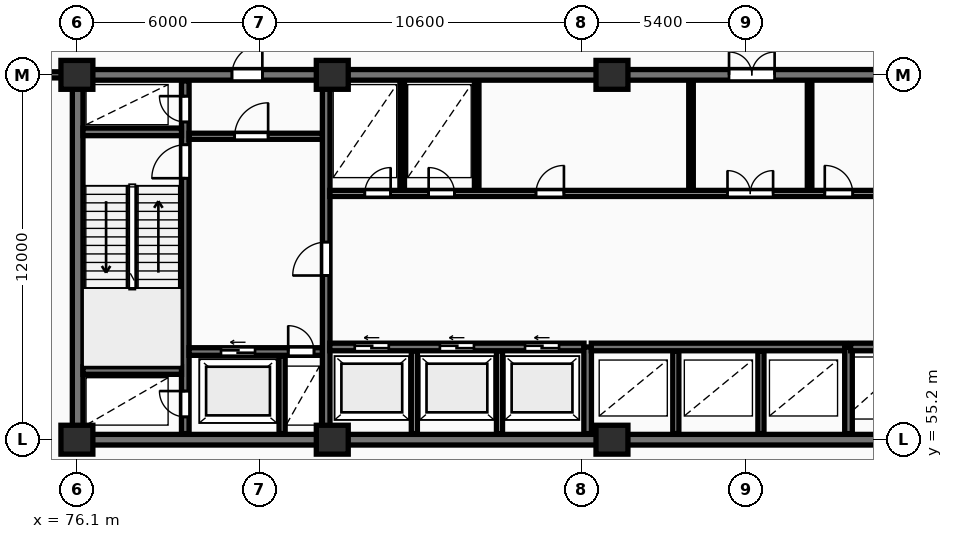
"""IFC4 building model, lengths in metres.
Left out: names, types, materials, properties, quantities, classifications, styles, units other than length and angle.
Written with IfcOpenShell. Run it as: python <this file> out.ifc"""

import sys

from ifc_helpers import new_model, si_unit, direction, frame, frame_2d, origin, origin_2d, place, context, subcontext, project, spatial, rectangle, extrude, element, fill, save


model = new_model("IFC4")
c1 = context("Model", 3, precision=1e-05, world=origin(), true_north=direction((0.0, 1.0)))
c2 = subcontext(c1, "Body", "Model", "MODEL_VIEW")
j1 = project(units=[si_unit("LENGTHUNIT", "METRE"), si_unit("PLANEANGLEUNIT", "RADIAN")], contexts=[c1])
p1 = place(None, origin())
s1 = spatial("IfcSite", under=j1, at=p1, CompositionType="ELEMENT")
p2 = place(p1, origin())
s2 = spatial("IfcBuilding", under=s1, at=p2, CompositionType="ELEMENT")
p3 = place(p2, frame((0.0, 0.0, 76.0)))
s3 = spatial("IfcBuildingStorey", under=s2, at=p3, CompositionType="ELEMENT", Elevation=76.0)
for number, where, z_axis, x_axis in (
    (1, (76.1, 55.2, 0.0), (0.0, 0.0, 1.0), (1.0, 0.0, 0.0)),
    (2, (76.1, 67.2, 0.0), (0.0, 0.0, 1.0), (1.0, 0.0, 0.0)),
    (3, (84.5, 55.2, 0.0), (0.0, 0.0, 1.0), (1.0, 0.0, 0.0)),
    (4, (84.5, 67.2, 0.0), (0.0, 0.0, 1.0), (1.0, 0.0, 0.0)),
    (5, (93.7, 55.2, 0.0), (0.0, 0.0, 1.0), (1.0, 0.0, 0.0)),
    (6, (93.7, 67.2, 0.0), (0.0, 0.0, 1.0), (1.0, 0.0, 0.0)),
):
    element("IfcColumn", number, at=place(p3, frame(where, z_axis=z_axis, x_axis=x_axis)), inside=s3, PredefinedType="COLUMN", context=c2, shape_type="SweptSolid", body=[
        extrude(rectangle(XDim=1.05, YDim=0.95, at=origin_2d()), origin(), (0.0, 0.0, 1.0), 4.8),
    ])
p4 = place(p3, frame((75.95, 55.2, 0.0), z_axis=(0.0, 0.0, 1.0), x_axis=(1.0, 0.0, 0.0)))
e7 = element("IfcWall", 7, at=p4, inside=s3, PredefinedType="SHEAR", context=c2, shape_type="SweptSolid", body=[
    extrude(rectangle(XDim=36.3, YDim=0.35, at=frame_2d((18.15, 0.0))), origin(), (0.0, 0.0, 1.0), 4.8),
])
p5 = place(p3, frame((76.125, 55.375, 0.0), z_axis=(0.0, 0.0, 1.0), x_axis=(0.0, 1.0, 0.0)))
e8 = element("IfcWall", 8, at=p5, inside=s3, PredefinedType="SHEAR", context=c2, shape_type="SweptSolid", body=[
    extrude(rectangle(XDim=11.65, YDim=0.35, at=frame_2d((5.825, 0.0))), origin(), (0.0, 0.0, 1.0), 4.8),
])
p6 = place(p3, frame((75.95, 67.2, 0.0), z_axis=(0.0, 0.0, 1.0), x_axis=(1.0, 0.0, 0.0)))
e9 = element("IfcWall", 9, at=p6, inside=s3, PredefinedType="SHEAR", context=c2, shape_type="SweptSolid", body=[
    extrude(rectangle(XDim=36.3, YDim=0.35, at=frame_2d((18.15, 0.0))), origin(), (0.0, 0.0, 1.0), 4.8),
])
p7 = place(p6, frame((5.25, 0.0, 0.0)))
e10 = element("IfcOpeningElement", 10, at=p7, cuts=e9, PredefinedType="OPENING", context=c2, shape_type="SweptSolid", body=[
    extrude(rectangle(XDim=1.0, YDim=2.15, at=frame_2d((0.5, 1.075))), frame((0.0, 0.185, 0.0), z_axis=(0.0, -1.0, 0.0), x_axis=(1.0, 0.0, 0.0)), (0.0, 0.0, 1.0), 0.37),
])
p8 = place(p6, frame((21.6, 0.0, 0.0)))
e11 = element("IfcOpeningElement", 11, at=p8, cuts=e9, PredefinedType="OPENING", context=c2, shape_type="SweptSolid", body=[
    extrude(rectangle(XDim=1.5, YDim=2.2, at=frame_2d((0.75, 1.1))), frame((0.0, 0.185, 0.0), z_axis=(0.0, -1.0, 0.0), x_axis=(1.0, 0.0, 0.0)), (0.0, 0.0, 1.0), 0.37),
])
p9 = place(p6, frame((30.45, 0.0, 0.0)))
e12 = element("IfcOpeningElement", 12, at=p9, cuts=e9, PredefinedType="OPENING", context=c2, shape_type="SweptSolid", body=[
    extrude(rectangle(XDim=1.0, YDim=2.15, at=frame_2d((0.5, 1.075))), frame((0.0, 0.185, 0.0), z_axis=(0.0, -1.0, 0.0), x_axis=(1.0, 0.0, 0.0)), (0.0, 0.0, 1.0), 0.37),
])
p10 = place(p3, frame((79.665, 55.4, 0.0), z_axis=(0.0, 0.0, 1.0), x_axis=(0.0, 1.0, 0.0)))
e13 = element("IfcWall", 13, at=p10, inside=s3, PredefinedType="SHEAR", context=c2, shape_type="SweptSolid", body=[
    extrude(rectangle(XDim=11.6, YDim=0.25, at=frame_2d((5.8, 0.0))), origin(), (0.0, 0.0, 1.0), 4.8),
])
p11 = place(p10, frame((0.55, 0.0, 0.0)))
e14 = element("IfcOpeningElement", 14, at=p11, cuts=e13, PredefinedType="OPENING", context=c2, shape_type="SweptSolid", body=[
    extrude(rectangle(XDim=0.85, YDim=2.05, at=frame_2d((0.425, 1.025))), frame((0.0, 0.135, 0.0), z_axis=(0.0, -1.0, 0.0), x_axis=(1.0, 0.0, 0.0)), (0.0, 0.0, 1.0), 0.27),
])
p12 = place(p10, frame((8.4, 0.0, 0.0)))
e15 = element("IfcOpeningElement", 15, at=p12, cuts=e13, PredefinedType="OPENING", context=c2, shape_type="SweptSolid", body=[
    extrude(rectangle(XDim=1.1, YDim=2.1, at=frame_2d((0.55, 1.05))), frame((0.0, 0.135, 0.0), z_axis=(0.0, -1.0, 0.0), x_axis=(1.0, 0.0, 0.0)), (0.0, 0.0, 1.0), 0.27),
])
p13 = place(p10, frame((10.25, 0.0, 0.0)))
e16 = element("IfcOpeningElement", 16, at=p13, cuts=e13, PredefinedType="OPENING", context=c2, shape_type="SweptSolid", body=[
    extrude(rectangle(XDim=0.85, YDim=2.05, at=frame_2d((0.425, 1.025))), frame((0.0, 0.135, 0.0), z_axis=(0.0, -1.0, 0.0), x_axis=(1.0, 0.0, 0.0)), (0.0, 0.0, 1.0), 0.27),
])
for number, where, z_axis, x_axis in (
    (17, (76.3, 57.475, 0.0), (0.0, 0.0, 1.0), (1.0, 0.0, 0.0)),
    (18, (76.3, 65.325, 0.0), (0.0, 0.0, 1.0), (1.0, 0.0, 0.0)),
):
    element("IfcWall", number, at=place(p3, frame(where, z_axis=z_axis, x_axis=x_axis)), inside=s3, PredefinedType="SHEAR", context=c2, shape_type="SweptSolid", body=[
        extrude(rectangle(XDim=3.24, YDim=0.25, at=frame_2d((1.62, 0.0))), origin(), (0.0, 0.0, 1.0), 4.8),
    ])
p14 = place(p3, frame((79.79, 58.1, 0.0), z_axis=(0.0, 0.0, 1.0), x_axis=(1.0, 0.0, 0.0)))
e19 = element("IfcWall", 19, at=p14, inside=s3, PredefinedType="SHEAR", context=c2, shape_type="SweptSolid", body=[
    extrude(rectangle(XDim=4.39, YDim=0.25, at=frame_2d((2.195, 0.0))), origin(), (0.0, 0.0, 1.0), 4.8),
])
p15 = place(p14, frame((1.05, 0.0, 0.0)))
e20 = element("IfcOpeningElement", 20, at=p15, cuts=e19, PredefinedType="OPENING", context=c2, shape_type="SweptSolid", body=[
    extrude(rectangle(XDim=1.12, YDim=2.12, at=frame_2d((0.56, 1.06))), frame((0.0, 0.135, 0.0), z_axis=(0.0, -1.0, 0.0), x_axis=(1.0, 0.0, 0.0)), (0.0, 0.0, 1.0), 0.27),
])
p16 = place(p14, frame((3.26, 0.0, 0.0)))
e21 = element("IfcOpeningElement", 21, at=p16, cuts=e19, PredefinedType="OPENING", context=c2, shape_type="SweptSolid", body=[
    extrude(rectangle(XDim=0.85, YDim=2.05, at=frame_2d((0.425, 1.025))), frame((0.0, 0.135, 0.0), z_axis=(0.0, -1.0, 0.0), x_axis=(1.0, 0.0, 0.0)), (0.0, 0.0, 1.0), 0.27),
])
p17 = place(p3, frame((82.85, 55.4, 0.0), z_axis=(0.0, 0.0, 1.0), x_axis=(0.0, 1.0, 0.0)))
e22 = element("IfcWall", 22, at=p17, inside=s3, PredefinedType="PARTITIONING", context=c2, shape_type="SweptSolid", body=[
    extrude(rectangle(XDim=2.56, YDim=0.2, at=frame_2d((1.28, 0.0))), origin(), (0.0, 0.0, 1.0), 4.48),
])
p18 = place(p3, frame((79.79, 65.18, 0.0), z_axis=(0.0, 0.0, 1.0), x_axis=(1.0, 0.0, 0.0)))
e23 = element("IfcWall", 23, at=p18, inside=s3, PredefinedType="PARTITIONING", context=c2, shape_type="SweptSolid", body=[
    extrude(rectangle(XDim=4.39, YDim=0.2, at=frame_2d((2.195, 0.0))), origin(), (0.0, 0.0, 1.0), 4.48),
])
p19 = place(p18, frame((1.5, 0.0, 0.0)))
e24 = element("IfcOpeningElement", 24, at=p19, cuts=e23, PredefinedType="OPENING", context=c2, shape_type="SweptSolid", body=[
    extrude(rectangle(XDim=1.1, YDim=2.1, at=frame_2d((0.55, 1.05))), frame((0.0, 0.11, 0.0), z_axis=(0.0, -1.0, 0.0), x_axis=(1.0, 0.0, 0.0)), (0.0, 0.0, 1.0), 0.22),
])
p20 = place(p3, frame((84.3, 55.4, 0.0), z_axis=(0.0, 0.0, 1.0), x_axis=(0.0, 1.0, 0.0)))
e25 = element("IfcWall", 25, at=p20, inside=s3, PredefinedType="SHEAR", context=c2, shape_type="SweptSolid", body=[
    extrude(rectangle(XDim=11.6, YDim=0.25, at=frame_2d((5.8, 0.0))), origin(), (0.0, 0.0, 1.0), 4.8),
])
p21 = place(p20, frame((5.2, 0.0, 0.0)))
e26 = element("IfcOpeningElement", 26, at=p21, cuts=e25, PredefinedType="OPENING", context=c2, shape_type="SweptSolid", body=[
    extrude(rectangle(XDim=1.1, YDim=2.1, at=frame_2d((0.55, 1.05))), frame((0.0, 0.135, 0.0), z_axis=(0.0, -1.0, 0.0), x_axis=(1.0, 0.0, 0.0)), (0.0, 0.0, 1.0), 0.27),
])
for number, where, z_axis, x_axis in (
    (27, (87.2, 55.4, 0.0), (0.0, 0.0, 1.0), (0.0, 1.0, 0.0)),
    (28, (90.0, 55.4, 0.0), (0.0, 0.0, 1.0), (0.0, 1.0, 0.0)),
):
    element("IfcWall", number, at=place(p3, frame(where, z_axis=z_axis, x_axis=x_axis)), inside=s3, PredefinedType="PARTITIONING", context=c2, shape_type="SweptSolid", body=[
        extrude(rectangle(XDim=2.72, YDim=0.2, at=frame_2d((1.36, 0.0))), origin(), (0.0, 0.0, 1.0), 4.48),
    ])
p22 = place(p3, frame((84.42, 58.25, 0.0), z_axis=(0.0, 0.0, 1.0), x_axis=(1.0, 0.0, 0.0)))
e29 = element("IfcWall", 29, at=p22, inside=s3, PredefinedType="SHEAR", context=c2, shape_type="SweptSolid", body=[
    extrude(rectangle(XDim=8.36, YDim=0.25, at=frame_2d((4.18, 0.0))), origin(), (0.0, 0.0, 1.0), 4.8),
])
p23 = place(p22, frame((0.82, 0.0, 0.0)))
e30 = element("IfcOpeningElement", 30, at=p23, cuts=e29, PredefinedType="OPENING", context=c2, shape_type="SweptSolid", body=[
    extrude(rectangle(XDim=1.12, YDim=2.12, at=frame_2d((0.56, 1.06))), frame((0.0, 0.135, 0.0), z_axis=(0.0, -1.0, 0.0), x_axis=(1.0, 0.0, 0.0)), (0.0, 0.0, 1.0), 0.27),
])
p24 = place(p22, frame((3.62, 0.0, 0.0)))
e31 = element("IfcOpeningElement", 31, at=p24, cuts=e29, PredefinedType="OPENING", context=c2, shape_type="SweptSolid", body=[
    extrude(rectangle(XDim=1.12, YDim=2.12, at=frame_2d((0.56, 1.06))), frame((0.0, 0.135, 0.0), z_axis=(0.0, -1.0, 0.0), x_axis=(1.0, 0.0, 0.0)), (0.0, 0.0, 1.0), 0.27),
])
p25 = place(p22, frame((6.42, 0.0, 0.0)))
e32 = element("IfcOpeningElement", 32, at=p25, cuts=e29, PredefinedType="OPENING", context=c2, shape_type="SweptSolid", body=[
    extrude(rectangle(XDim=1.12, YDim=2.12, at=frame_2d((0.56, 1.06))), frame((0.0, 0.135, 0.0), z_axis=(0.0, -1.0, 0.0), x_axis=(1.0, 0.0, 0.0)), (0.0, 0.0, 1.0), 0.27),
])
p26 = place(p3, frame((92.9, 55.4, 0.0), z_axis=(0.0, 0.0, 1.0), x_axis=(0.0, 1.0, 0.0)))
e33 = element("IfcWall", 33, at=p26, inside=s3, PredefinedType="SHEAR", context=c2, shape_type="SweptSolid", body=[
    extrude(rectangle(XDim=2.85, YDim=0.25, at=frame_2d((1.425, 0.0))), origin(), (0.0, 0.0, 1.0), 4.8),
])
for number, where, z_axis, x_axis in (
    (34, (95.8, 55.4, 0.0), (0.0, 0.0, 1.0), (0.0, 1.0, 0.0)),
    (35, (98.6, 55.4, 0.0), (0.0, 0.0, 1.0), (0.0, 1.0, 0.0)),
):
    element("IfcWall", number, at=place(p3, frame(where, z_axis=z_axis, x_axis=x_axis)), inside=s3, PredefinedType="PARTITIONING", context=c2, shape_type="SweptSolid", body=[
        extrude(rectangle(XDim=2.72, YDim=0.2, at=frame_2d((1.36, 0.0))), origin(), (0.0, 0.0, 1.0), 4.48),
    ])
p27 = place(p3, frame((93.02, 58.25, 0.0), z_axis=(0.0, 0.0, 1.0), x_axis=(1.0, 0.0, 0.0)))
e36 = element("IfcWall", 36, at=p27, inside=s3, PredefinedType="SHEAR", context=c2, shape_type="SweptSolid", body=[
    extrude(rectangle(XDim=8.36, YDim=0.25, at=frame_2d((4.18, 0.0))), origin(), (0.0, 0.0, 1.0), 4.8),
])
p28 = place(p3, frame((101.48, 55.4, 0.0), z_axis=(0.0, 0.0, 1.0), x_axis=(0.0, 1.0, 0.0)))
e37 = element("IfcWall", 37, at=p28, inside=s3, PredefinedType="SHEAR", context=c2, shape_type="SweptSolid", body=[
    extrude(rectangle(XDim=2.85, YDim=0.25, at=frame_2d((1.425, 0.0))), origin(), (0.0, 0.0, 1.0), 4.8),
])
p29 = place(p3, frame((101.55, 58.25, 0.0), z_axis=(0.0, 0.0, 1.0), x_axis=(1.0, 0.0, 0.0)))
e38 = element("IfcWall", 38, at=p29, inside=s3, PredefinedType="SHEAR", context=c2, shape_type="SweptSolid", body=[
    extrude(rectangle(XDim=4.6, YDim=0.25, at=frame_2d((2.3, 0.0))), origin(), (0.0, 0.0, 1.0), 4.8),
])
for number, where, z_axis, x_axis in (
    (39, (86.8, 63.4, 0.0), (0.0, 0.0, 1.0), (0.0, 1.0, 0.0)),
    (40, (89.25, 63.4, 0.0), (0.0, 0.0, 1.0), (0.0, 1.0, 0.0)),
    (41, (96.3, 63.4, 0.0), (0.0, 0.0, 1.0), (0.0, 1.0, 0.0)),
    (42, (100.2, 63.4, 0.0), (0.0, 0.0, 1.0), (0.0, 1.0, 0.0)),
):
    element("IfcWall", number, at=place(p3, frame(where, z_axis=z_axis, x_axis=x_axis)), inside=s3, PredefinedType="PARTITIONING", context=c2, shape_type="SweptSolid", body=[
        extrude(rectangle(XDim=3.6, YDim=0.15, at=frame_2d((1.8, 0.0))), origin(), (0.0, 0.0, 1.0), 4.48),
    ])
p30 = place(p3, frame((84.42, 63.3, 0.0), z_axis=(0.0, 0.0, 1.0), x_axis=(1.0, 0.0, 0.0)))
e43 = element("IfcWall", 43, at=p30, inside=s3, PredefinedType="PARTITIONING", context=c2, shape_type="SweptSolid", body=[
    extrude(rectangle(XDim=19.83, YDim=0.2, at=frame_2d((9.915, 0.0))), origin(), (0.0, 0.0, 1.0), 4.48),
])
p31 = place(p30, frame((1.15, 0.0, 0.0)))
e44 = element("IfcOpeningElement", 44, at=p31, cuts=e43, PredefinedType="OPENING", context=c2, shape_type="SweptSolid", body=[
    extrude(rectangle(XDim=0.85, YDim=2.05, at=frame_2d((0.425, 1.025))), frame((0.0, 0.11, 0.0), z_axis=(0.0, -1.0, 0.0), x_axis=(1.0, 0.0, 0.0)), (0.0, 0.0, 1.0), 0.22),
])
p32 = place(p30, frame((3.25, 0.0, 0.0)))
e45 = element("IfcOpeningElement", 45, at=p32, cuts=e43, PredefinedType="OPENING", context=c2, shape_type="SweptSolid", body=[
    extrude(rectangle(XDim=0.85, YDim=2.05, at=frame_2d((0.425, 1.025))), frame((0.0, 0.11, 0.0), z_axis=(0.0, -1.0, 0.0), x_axis=(1.0, 0.0, 0.0)), (0.0, 0.0, 1.0), 0.22),
])
p33 = place(p30, frame((13.08, 0.0, 0.0)))
e46 = element("IfcOpeningElement", 46, at=p33, cuts=e43, PredefinedType="OPENING", context=c2, shape_type="SweptSolid", body=[
    extrude(rectangle(XDim=1.5, YDim=2.2, at=frame_2d((0.75, 1.1))), frame((0.0, 0.11, 0.0), z_axis=(0.0, -1.0, 0.0), x_axis=(1.0, 0.0, 0.0)), (0.0, 0.0, 1.0), 0.22),
])
p34 = place(p30, frame((6.78, 0.0, 0.0)))
e47 = element("IfcOpeningElement", 47, at=p34, cuts=e43, PredefinedType="OPENING", context=c2, shape_type="SweptSolid", body=[
    extrude(rectangle(XDim=0.92, YDim=2.08, at=frame_2d((0.46, 1.04))), frame((0.0, 0.11, 0.0), z_axis=(0.0, -1.0, 0.0), x_axis=(1.0, 0.0, 0.0)), (0.0, 0.0, 1.0), 0.22),
])
p35 = place(p30, frame((16.28, 0.0, 0.0)))
e48 = element("IfcOpeningElement", 48, at=p35, cuts=e43, PredefinedType="OPENING", context=c2, shape_type="SweptSolid", body=[
    extrude(rectangle(XDim=0.92, YDim=2.08, at=frame_2d((0.46, 1.04))), frame((0.0, 0.11, 0.0), z_axis=(0.0, -1.0, 0.0), x_axis=(1.0, 0.0, 0.0)), (0.0, 0.0, 1.0), 0.22),
])
p36 = place(p3, frame((55.35, 67.2, 0.0), z_axis=(0.0, 0.0, 1.0), x_axis=(1.0, 0.0, 0.0)))
e49 = element("IfcWall", 49, at=p36, inside=s3, PredefinedType="PARTITIONING", context=c2, shape_type="SweptSolid", body=[
    extrude(rectangle(XDim=20.6, YDim=0.2, at=frame_2d((10.3, 0.0))), origin(), (0.0, 0.0, 1.0), 3.23),
])
p37 = place(p36, frame((8.8, 0.0, 0.0)))
e50 = element("IfcOpeningElement", 50, at=p37, cuts=e49, PredefinedType="OPENING", context=c2, shape_type="SweptSolid", body=[
    extrude(rectangle(XDim=1.1, YDim=2.1, at=frame_2d((0.55, 1.05))), frame((0.0, 0.11, 0.0), z_axis=(0.0, -1.0, 0.0), x_axis=(1.0, 0.0, 0.0)), (0.0, 0.0, 1.0), 0.22),
])
p38 = place(p36, frame((14.495, 0.0, 0.0)))
e51 = element("IfcOpeningElement", 51, at=p38, cuts=e49, PredefinedType="OPENING", context=c2, shape_type="SweptSolid", body=[
    extrude(rectangle(XDim=1.1, YDim=2.1, at=frame_2d((0.55, 1.05))), frame((0.0, 0.11, 0.0), z_axis=(0.0, -1.0, 0.0), x_axis=(1.0, 0.0, 0.0)), (0.0, 0.0, 1.0), 0.22),
])
p39 = place(p7, origin())
e52 = element("IfcDoor", 52, at=p39, inside=s3, OperationType="SINGLE_SWING_RIGHT", PredefinedType="DOOR", context=c2, shape_type="SweptSolid", body=[
    extrude(rectangle(XDim=1.0, YDim=2.15, at=frame_2d((0.5, 1.075))), frame((0.0, 0.025, 0.0), z_axis=(0.0, -1.0, 0.0), x_axis=(1.0, 0.0, 0.0)), (0.0, 0.0, 1.0), 0.05),
])
fill(e10, e52)
p40 = place(p8, origin())
e53 = element("IfcDoor", 53, at=p40, inside=s3, OperationType="DOUBLE_DOOR_SINGLE_SWING", PredefinedType="DOOR", context=c2, shape_type="SweptSolid", body=[
    extrude(rectangle(XDim=1.5, YDim=2.2, at=frame_2d((0.75, 1.1))), frame((0.0, 0.025, 0.0), z_axis=(0.0, -1.0, 0.0), x_axis=(1.0, 0.0, 0.0)), (0.0, 0.0, 1.0), 0.05),
])
fill(e11, e53)
p41 = place(p11, origin())
e54 = element("IfcDoor", 54, at=p41, inside=s3, OperationType="SINGLE_SWING_RIGHT", PredefinedType="DOOR", context=c2, shape_type="SweptSolid", body=[
    extrude(rectangle(XDim=0.85, YDim=2.05, at=frame_2d((0.425, 1.025))), frame((0.0, 0.025, 0.0), z_axis=(0.0, -1.0, 0.0), x_axis=(1.0, 0.0, 0.0)), (0.0, 0.0, 1.0), 0.05),
])
fill(e14, e54)
p42 = place(p12, origin())
e55 = element("IfcDoor", 55, at=p42, inside=s3, OperationType="SINGLE_SWING_LEFT", PredefinedType="DOOR", context=c2, shape_type="SweptSolid", body=[
    extrude(rectangle(XDim=1.1, YDim=2.1, at=frame_2d((0.55, 1.05))), frame((0.0, 0.025, 0.0), z_axis=(0.0, -1.0, 0.0), x_axis=(1.0, 0.0, 0.0)), (0.0, 0.0, 1.0), 0.05),
])
fill(e15, e55)
p43 = place(p13, origin())
e56 = element("IfcDoor", 56, at=p43, inside=s3, OperationType="SINGLE_SWING_RIGHT", PredefinedType="DOOR", context=c2, shape_type="SweptSolid", body=[
    extrude(rectangle(XDim=0.85, YDim=2.05, at=frame_2d((0.425, 1.025))), frame((0.0, 0.025, 0.0), z_axis=(0.0, -1.0, 0.0), x_axis=(1.0, 0.0, 0.0)), (0.0, 0.0, 1.0), 0.05),
])
fill(e16, e56)
p44 = place(p15, origin())
e57 = element("IfcDoor", 57, at=p44, inside=s3, OperationType="SLIDING_TO_LEFT", PredefinedType="DOOR", context=c2, shape_type="SweptSolid", body=[
    extrude(rectangle(XDim=1.12, YDim=2.12, at=frame_2d((0.56, 1.06))), frame((0.0, 0.025, 0.0), z_axis=(0.0, -1.0, 0.0), x_axis=(1.0, 0.0, 0.0)), (0.0, 0.0, 1.0), 0.05),
])
fill(e20, e57)
p45 = place(p16, origin())
e58 = element("IfcDoor", 58, at=p45, inside=s3, OperationType="SINGLE_SWING_LEFT", PredefinedType="DOOR", context=c2, shape_type="SweptSolid", body=[
    extrude(rectangle(XDim=0.85, YDim=2.05, at=frame_2d((0.425, 1.025))), frame((0.0, 0.025, 0.0), z_axis=(0.0, -1.0, 0.0), x_axis=(1.0, 0.0, 0.0)), (0.0, 0.0, 1.0), 0.05),
])
fill(e21, e58)
p46 = place(p19, origin())
e59 = element("IfcDoor", 59, at=p46, inside=s3, OperationType="SINGLE_SWING_RIGHT", PredefinedType="DOOR", context=c2, shape_type="SweptSolid", body=[
    extrude(rectangle(XDim=1.1, YDim=2.1, at=frame_2d((0.55, 1.05))), frame((0.0, 0.025, 0.0), z_axis=(0.0, -1.0, 0.0), x_axis=(1.0, 0.0, 0.0)), (0.0, 0.0, 1.0), 0.05),
])
fill(e24, e59)
p47 = place(p21, origin())
e60 = element("IfcDoor", 60, at=p47, inside=s3, OperationType="SINGLE_SWING_LEFT", PredefinedType="DOOR", context=c2, shape_type="SweptSolid", body=[
    extrude(rectangle(XDim=1.1, YDim=2.1, at=frame_2d((0.55, 1.05))), frame((0.0, 0.025, 0.0), z_axis=(0.0, -1.0, 0.0), x_axis=(1.0, 0.0, 0.0)), (0.0, 0.0, 1.0), 0.05),
])
fill(e26, e60)
p48 = place(p23, origin())
e61 = element("IfcDoor", 61, at=p48, inside=s3, OperationType="SLIDING_TO_LEFT", PredefinedType="DOOR", context=c2, shape_type="SweptSolid", body=[
    extrude(rectangle(XDim=1.12, YDim=2.12, at=frame_2d((0.56, 1.06))), frame((0.0, 0.025, 0.0), z_axis=(0.0, -1.0, 0.0), x_axis=(1.0, 0.0, 0.0)), (0.0, 0.0, 1.0), 0.05),
])
fill(e30, e61)
p49 = place(p24, origin())
e62 = element("IfcDoor", 62, at=p49, inside=s3, OperationType="SLIDING_TO_LEFT", PredefinedType="DOOR", context=c2, shape_type="SweptSolid", body=[
    extrude(rectangle(XDim=1.12, YDim=2.12, at=frame_2d((0.56, 1.06))), frame((0.0, 0.025, 0.0), z_axis=(0.0, -1.0, 0.0), x_axis=(1.0, 0.0, 0.0)), (0.0, 0.0, 1.0), 0.05),
])
fill(e31, e62)
p50 = place(p25, origin())
e63 = element("IfcDoor", 63, at=p50, inside=s3, OperationType="SLIDING_TO_LEFT", PredefinedType="DOOR", context=c2, shape_type="SweptSolid", body=[
    extrude(rectangle(XDim=1.12, YDim=2.12, at=frame_2d((0.56, 1.06))), frame((0.0, 0.025, 0.0), z_axis=(0.0, -1.0, 0.0), x_axis=(1.0, 0.0, 0.0)), (0.0, 0.0, 1.0), 0.05),
])
fill(e32, e63)
p51 = place(p31, origin())
e64 = element("IfcDoor", 64, at=p51, inside=s3, OperationType="SINGLE_SWING_RIGHT", PredefinedType="DOOR", context=c2, shape_type="SweptSolid", body=[
    extrude(rectangle(XDim=0.85, YDim=2.05, at=frame_2d((0.425, 1.025))), frame((0.0, 0.025, 0.0), z_axis=(0.0, -1.0, 0.0), x_axis=(1.0, 0.0, 0.0)), (0.0, 0.0, 1.0), 0.05),
])
fill(e44, e64)
p52 = place(p32, origin())
e65 = element("IfcDoor", 65, at=p52, inside=s3, OperationType="SINGLE_SWING_LEFT", PredefinedType="DOOR", context=c2, shape_type="SweptSolid", body=[
    extrude(rectangle(XDim=0.85, YDim=2.05, at=frame_2d((0.425, 1.025))), frame((0.0, 0.025, 0.0), z_axis=(0.0, -1.0, 0.0), x_axis=(1.0, 0.0, 0.0)), (0.0, 0.0, 1.0), 0.05),
])
fill(e45, e65)
p53 = place(p33, origin())
e66 = element("IfcDoor", 66, at=p53, inside=s3, OperationType="DOUBLE_DOOR_SINGLE_SWING", PredefinedType="DOOR", context=c2, shape_type="SweptSolid", body=[
    extrude(rectangle(XDim=1.5, YDim=2.2, at=frame_2d((0.75, 1.1))), frame((0.0, 0.025, 0.0), z_axis=(0.0, -1.0, 0.0), x_axis=(1.0, 0.0, 0.0)), (0.0, 0.0, 1.0), 0.05),
])
fill(e46, e66)
p54 = place(p34, origin())
e67 = element("IfcDoor", 67, at=p54, inside=s3, OperationType="SINGLE_SWING_RIGHT", PredefinedType="DOOR", context=c2, shape_type="SweptSolid", body=[
    extrude(rectangle(XDim=0.92, YDim=2.08, at=frame_2d((0.46, 1.04))), frame((0.0, 0.025, 0.0), z_axis=(0.0, -1.0, 0.0), x_axis=(1.0, 0.0, 0.0)), (0.0, 0.0, 1.0), 0.05),
])
fill(e47, e67)
p55 = place(p35, origin())
e68 = element("IfcDoor", 68, at=p55, inside=s3, OperationType="SINGLE_SWING_LEFT", PredefinedType="DOOR", context=c2, shape_type="SweptSolid", body=[
    extrude(rectangle(XDim=0.92, YDim=2.08, at=frame_2d((0.46, 1.04))), frame((0.0, 0.025, 0.0), z_axis=(0.0, -1.0, 0.0), x_axis=(1.0, 0.0, 0.0)), (0.0, 0.0, 1.0), 0.05),
])
fill(e48, e68)
save(model, sys.argv[1])
